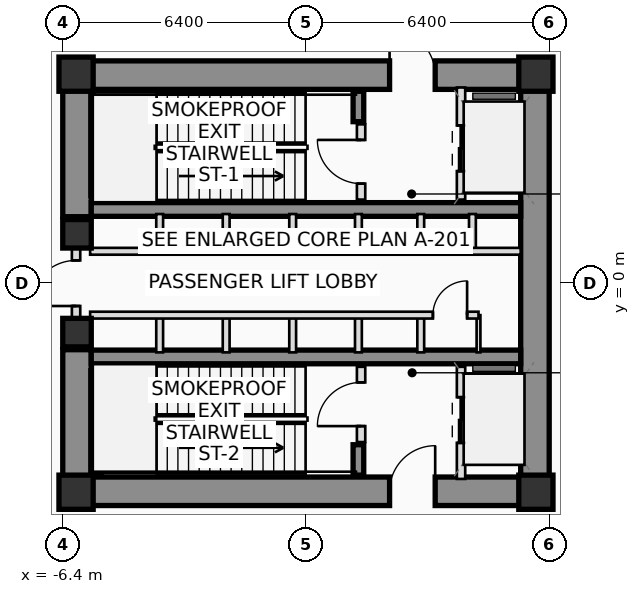
"""IFC4 building model, lengths in metres.
Left out: names, types, materials, properties, quantities, classifications, styles, units other than length and angle.
Written with IfcOpenShell. Run it as: python <this file> out.ifc"""

import sys

from ifc_helpers import new_model, si_unit, direction, frame, frame_2d, origin, origin_2d, place, context, subcontext, project, spatial, rectangle, extrude, source, transform, mapped, element, fill, save


model = new_model("IFC4")
c1 = context("Model", 3, precision=1e-05, world=origin(), true_north=direction((0.0, 1.0)))
c2 = subcontext(c1, "Body", "Model", "MODEL_VIEW")
j1 = project(units=[si_unit("LENGTHUNIT", "METRE"), si_unit("PLANEANGLEUNIT", "RADIAN")], contexts=[c1])
p1 = place(None, origin())
s1 = spatial("IfcSite", under=j1, at=p1, CompositionType="ELEMENT")
p2 = place(p1, origin())
s2 = spatial("IfcBuilding", under=s1, at=p2, CompositionType="ELEMENT")
p3 = place(p2, frame((0.0, 0.0, -9.6)))
s3 = spatial("IfcBuildingStorey", under=s2, at=p3, CompositionType="ELEMENT", Elevation=-9.6)
m1 = source(origin(), c2, "Body", "SweptSolid", [
    extrude(rectangle(XDim=0.9, YDim=0.9, at=origin_2d()), origin(), (0.0, 0.0, 1.0), 4.8),
])
for number, where, z_axis, x_axis in (
    (1, (-6.05, -5.5, 0.0), (0.0, 0.0, 1.0), (1.0, 0.0, 0.0)),
    (2, (6.05, -5.5, 0.0), (0.0, 0.0, 1.0), (1.0, 0.0, 0.0)),
    (3, (6.05, 5.5, 0.0), (0.0, 0.0, 1.0), (1.0, 0.0, 0.0)),
    (4, (-6.05, 5.5, 0.0), (0.0, 0.0, 1.0), (1.0, 0.0, 0.0)),
):
    element("IfcColumn", number, at=place(p3, frame(where, z_axis=z_axis, x_axis=x_axis)), inside=s3, PredefinedType="COLUMN", context=c2, shape_type="MappedRepresentation", body=[
        mapped(m1, transform((0.0, 0.0, 0.0), scale=1.0)),
    ])
p4 = place(p3, frame((-6.4, 5.475, 0.0), z_axis=(0.0, 0.0, 1.0), x_axis=(1.0, 0.0, 0.0)))
e5 = element("IfcWall", 5, at=p4, inside=s3, PredefinedType="SHEAR", context=c2, shape_type="SweptSolid", body=[
    extrude(rectangle(XDim=12.8, YDim=0.75, at=frame_2d((6.4, 0.0))), origin(), (0.0, 0.0, 1.0), 4.8),
])
p5 = place(p4, frame((8.6, 0.0, 0.0)))
e6 = element("IfcOpeningElement", 6, at=p5, cuts=e5, PredefinedType="OPENING", context=c2, shape_type="SweptSolid", body=[
    extrude(rectangle(XDim=1.2, YDim=2.2, at=frame_2d((0.6, 1.1))), frame((0.0, 0.385, 0.0), z_axis=(0.0, -1.0, 0.0), x_axis=(1.0, 0.0, 0.0)), (0.0, 0.0, 1.0), 0.77),
])
p6 = place(p3, frame((-6.4, -5.475, 0.0), z_axis=(0.0, 0.0, 1.0), x_axis=(1.0, 0.0, 0.0)))
e7 = element("IfcWall", 7, at=p6, inside=s3, PredefinedType="SHEAR", context=c2, shape_type="SweptSolid", body=[
    extrude(rectangle(XDim=12.8, YDim=0.75, at=frame_2d((6.4, 0.0))), origin(), (0.0, 0.0, 1.0), 4.8),
])
p7 = place(p6, frame((8.6, 0.0, 0.0)))
e8 = element("IfcOpeningElement", 8, at=p7, cuts=e7, PredefinedType="OPENING", context=c2, shape_type="SweptSolid", body=[
    extrude(rectangle(XDim=1.2, YDim=2.2, at=frame_2d((0.6, 1.1))), frame((0.0, 0.385, 0.0), z_axis=(0.0, -1.0, 0.0), x_axis=(1.0, 0.0, 0.0)), (0.0, 0.0, 1.0), 0.77),
])
p8 = place(p3, frame((6.025, -5.1, 0.0), z_axis=(0.0, 0.0, 1.0), x_axis=(0.0, 1.0, 0.0)))
e9 = element("IfcWall", 9, at=p8, inside=s3, PredefinedType="SHEAR", context=c2, shape_type="SweptSolid", body=[
    extrude(rectangle(XDim=10.2, YDim=0.75, at=frame_2d((5.1, 0.0))), origin(), (0.0, 0.0, 1.0), 4.8),
])
for number, where, z_axis, x_axis in (
    (10, (-6.025, -5.1, 0.0), (0.0, 0.0, 1.0), (0.0, 1.0, 0.0)),
    (11, (-6.025, 1.75, 0.0), (0.0, 0.0, 1.0), (0.0, 1.0, 0.0)),
):
    element("IfcWall", number, at=place(p3, frame(where, z_axis=z_axis, x_axis=x_axis)), inside=s3, PredefinedType="SHEAR", context=c2, shape_type="SweptSolid", body=[
        extrude(rectangle(XDim=3.35, YDim=0.75, at=frame_2d((1.675, 0.0))), origin(), (0.0, 0.0, 1.0), 4.8),
    ])
for number, where, z_axis, x_axis in (
    (12, (-5.65, 1.94, 0.0), (0.0, 0.0, 1.0), (1.0, 0.0, 0.0)),
    (13, (-5.65, -1.94, 0.0), (0.0, 0.0, 1.0), (1.0, 0.0, 0.0)),
):
    element("IfcWall", number, at=place(p3, frame(where, z_axis=z_axis, x_axis=x_axis)), inside=s3, PredefinedType="SHEAR", context=c2, shape_type="SweptSolid", body=[
        extrude(rectangle(XDim=11.3, YDim=0.36, at=frame_2d((5.65, 0.0))), origin(), (0.0, 0.0, 1.0), 4.8),
    ])
p9 = place(p3, frame((-5.52, 2.3, 0.0), z_axis=(0.0, 0.0, 1.0), x_axis=(0.0, 1.0, 0.0)))
e14 = element("IfcWall", 14, at=p9, inside=s3, PredefinedType="SHEAR", context=c2, shape_type="SweptSolid", body=[
    extrude(rectangle(XDim=2.75, YDim=0.28, at=frame_2d((1.375, 0.0))), origin(), (0.0, 0.0, 1.0), 4.8),
])
p10 = place(p3, frame((1.38, 4.25, 0.0), z_axis=(0.0, 0.0, 1.0), x_axis=(0.0, 1.0, 0.0)))
e15 = element("IfcWall", 15, at=p10, inside=s3, PredefinedType="SHEAR", context=c2, shape_type="SweptSolid", body=[
    extrude(rectangle(XDim=0.8, YDim=0.28, at=frame_2d((0.4, 0.0))), origin(), (0.0, 0.0, 1.0), 4.8),
])
p11 = place(p3, frame((-5.52, -5.05, 0.0), z_axis=(0.0, 0.0, 1.0), x_axis=(0.0, 1.0, 0.0)))
e16 = element("IfcWall", 16, at=p11, inside=s3, PredefinedType="SHEAR", context=c2, shape_type="SweptSolid", body=[
    extrude(rectangle(XDim=2.75, YDim=0.28, at=frame_2d((1.375, 0.0))), origin(), (0.0, 0.0, 1.0), 4.8),
])
p12 = place(p3, frame((1.38, -5.05, 0.0), z_axis=(0.0, 0.0, 1.0), x_axis=(0.0, 1.0, 0.0)))
e17 = element("IfcWall", 17, at=p12, inside=s3, PredefinedType="SHEAR", context=c2, shape_type="SweptSolid", body=[
    extrude(rectangle(XDim=0.8, YDim=0.28, at=frame_2d((0.4, 0.0))), origin(), (0.0, 0.0, 1.0), 4.8),
])
m2 = source(origin(), c2, "Body", "SweptSolid", [
    extrude(rectangle(XDim=0.75, YDim=0.75, at=origin_2d()), origin(), (0.0, 0.0, 1.0), 4.8),
])
for number, where, z_axis, x_axis in (
    (18, (-6.025, -1.3, 0.0), (0.0, 0.0, 1.0), (1.0, 0.0, 0.0)),
    (19, (-6.025, 1.3, 0.0), (0.0, 0.0, 1.0), (1.0, 0.0, 0.0)),
):
    element("IfcColumn", number, at=place(p3, frame(where, z_axis=z_axis, x_axis=x_axis)), inside=s3, PredefinedType="COLUMN", context=c2, shape_type="MappedRepresentation", body=[
        mapped(m2, transform((0.0, 0.0, 0.0), scale=1.0)),
    ])
p13 = place(p3, frame((-6.05, -0.95, 0.0), z_axis=(0.0, 0.0, 1.0), x_axis=(0.0, 1.0, 0.0)))
e20 = element("IfcWall", 20, at=p13, inside=s3, PredefinedType="PLUMBINGWALL", context=c2, shape_type="SweptSolid", body=[
    extrude(rectangle(XDim=1.9, YDim=0.22, at=frame_2d((0.95, 0.0))), origin(), (0.0, 0.0, 1.0), 3.5),
])
p14 = place(p13, frame((0.35, 0.0, 0.0)))
e21 = element("IfcOpeningElement", 21, at=p14, cuts=e20, PredefinedType="OPENING", context=c2, shape_type="SweptSolid", body=[
    extrude(rectangle(XDim=1.2, YDim=2.2, at=frame_2d((0.6, 1.1))), frame((0.0, 0.12, 0.0), z_axis=(0.0, -1.0, 0.0), x_axis=(1.0, 0.0, 0.0)), (0.0, 0.0, 1.0), 0.24),
])
p15 = place(p3, frame((1.45, 2.2, 0.0), z_axis=(0.0, 0.0, 1.0), x_axis=(0.0, 1.0, 0.0)))
e22 = element("IfcWall", 22, at=p15, inside=s3, PredefinedType="PLUMBINGWALL", context=c2, shape_type="SweptSolid", body=[
    extrude(rectangle(XDim=1.98, YDim=0.22, at=frame_2d((0.99, 0.0))), origin(), (0.0, 0.0, 1.0), 4.52),
])
p16 = place(p15, frame((0.42, 0.0, 0.0)))
e23 = element("IfcOpeningElement", 23, at=p16, cuts=e22, PredefinedType="OPENING", context=c2, shape_type="SweptSolid", body=[
    extrude(rectangle(XDim=1.15, YDim=2.15, at=frame_2d((0.575, 1.075))), frame((0.0, 0.12, 0.0), z_axis=(0.0, -1.0, 0.0), x_axis=(1.0, 0.0, 0.0)), (0.0, 0.0, 1.0), 0.24),
])
p17 = place(p3, frame((4.08, 2.2, 0.0), z_axis=(0.0, 0.0, 1.0), x_axis=(0.0, 1.0, 0.0)))
e24 = element("IfcWall", 24, at=p17, inside=s3, PredefinedType="PLUMBINGWALL", context=c2, shape_type="SweptSolid", body=[
    extrude(rectangle(XDim=2.95, YDim=0.22, at=frame_2d((1.475, 0.0))), origin(), (0.0, 0.0, 1.0), 4.52),
])
p18 = place(p17, frame((0.75, 0.0, 0.0)))
e25 = element("IfcOpeningElement", 25, at=p18, cuts=e24, PredefinedType="OPENING", context=c2, shape_type="SweptSolid", body=[
    extrude(rectangle(XDim=1.2, YDim=2.25, at=frame_2d((0.6, 1.125))), frame((0.0, 0.12, 0.0), z_axis=(0.0, -1.0, 0.0), x_axis=(1.0, 0.0, 0.0)), (0.0, 0.0, 1.0), 0.24),
])
p19 = place(p3, frame((1.45, -4.18, 0.0), z_axis=(0.0, 0.0, 1.0), x_axis=(0.0, 1.0, 0.0)))
e26 = element("IfcWall", 26, at=p19, inside=s3, PredefinedType="PLUMBINGWALL", context=c2, shape_type="SweptSolid", body=[
    extrude(rectangle(XDim=1.98, YDim=0.22, at=frame_2d((0.99, 0.0))), origin(), (0.0, 0.0, 1.0), 4.52),
])
p20 = place(p19, frame((0.42, 0.0, 0.0)))
e27 = element("IfcOpeningElement", 27, at=p20, cuts=e26, PredefinedType="OPENING", context=c2, shape_type="SweptSolid", body=[
    extrude(rectangle(XDim=1.15, YDim=2.15, at=frame_2d((0.575, 1.075))), frame((0.0, 0.12, 0.0), z_axis=(0.0, -1.0, 0.0), x_axis=(1.0, 0.0, 0.0)), (0.0, 0.0, 1.0), 0.24),
])
p21 = place(p3, frame((4.08, -5.15, 0.0), z_axis=(0.0, 0.0, 1.0), x_axis=(0.0, 1.0, 0.0)))
e28 = element("IfcWall", 28, at=p21, inside=s3, PredefinedType="PLUMBINGWALL", context=c2, shape_type="SweptSolid", body=[
    extrude(rectangle(XDim=2.95, YDim=0.22, at=frame_2d((1.475, 0.0))), origin(), (0.0, 0.0, 1.0), 4.52),
])
p22 = place(p21, frame((0.95, 0.0, 0.0)))
e29 = element("IfcOpeningElement", 29, at=p22, cuts=e28, PredefinedType="OPENING", context=c2, shape_type="SweptSolid", body=[
    extrude(rectangle(XDim=1.2, YDim=2.25, at=frame_2d((0.6, 1.125))), frame((0.0, 0.12, 0.0), z_axis=(0.0, -1.0, 0.0), x_axis=(1.0, 0.0, 0.0)), (0.0, 0.0, 1.0), 0.24),
])
for number, where, z_axis, x_axis in (
    (30, (-3.85, 0.84, 0.0), (0.0, 0.0, 1.0), (0.0, 1.0, 0.0)),
    (31, (-3.85, -1.82, 0.0), (0.0, 0.0, 1.0), (0.0, 1.0, 0.0)),
    (32, (-2.1, 0.84, 0.0), (0.0, 0.0, 1.0), (0.0, 1.0, 0.0)),
    (33, (-2.1, -1.82, 0.0), (0.0, 0.0, 1.0), (0.0, 1.0, 0.0)),
    (34, (-0.35, 0.84, 0.0), (0.0, 0.0, 1.0), (0.0, 1.0, 0.0)),
    (35, (-0.35, -1.82, 0.0), (0.0, 0.0, 1.0), (0.0, 1.0, 0.0)),
    (36, (1.38, 0.84, 0.0), (0.0, 0.0, 1.0), (0.0, 1.0, 0.0)),
    (37, (1.38, -1.82, 0.0), (0.0, 0.0, 1.0), (0.0, 1.0, 0.0)),
    (38, (3.02, 0.84, 0.0), (0.0, 0.0, 1.0), (0.0, 1.0, 0.0)),
    (39, (4.38, 0.84, 0.0), (0.0, 0.0, 1.0), (0.0, 1.0, 0.0)),
    (40, (3.02, -1.82, 0.0), (0.0, 0.0, 1.0), (0.0, 1.0, 0.0)),
):
    element("IfcWall", number, at=place(p3, frame(where, z_axis=z_axis, x_axis=x_axis)), inside=s3, PredefinedType="PLUMBINGWALL", context=c2, shape_type="SweptSolid", body=[
        extrude(rectangle(XDim=0.98, YDim=0.18, at=frame_2d((0.49, 0.0))), origin(), (0.0, 0.0, 1.0), 4.52),
    ])
p23 = place(p3, frame((4.54, -1.82, 0.0), z_axis=(0.0, 0.0, 1.0), x_axis=(0.0, 1.0, 0.0)))
e41 = element("IfcWall", 41, at=p23, inside=s3, PredefinedType="PARTITIONING", context=c2, shape_type="SweptSolid", body=[
    extrude(rectangle(XDim=0.98, YDim=0.1, at=frame_2d((0.49, 0.0))), origin(), (0.0, 0.0, 1.0), 4.52),
])
p24 = place(p3, frame((-5.68, 0.84, 0.0), z_axis=(0.0, 0.0, 1.0), x_axis=(1.0, 0.0, 0.0)))
e42 = element("IfcWall", 42, at=p24, inside=s3, PredefinedType="PLUMBINGWALL", context=c2, shape_type="SweptSolid", body=[
    extrude(rectangle(XDim=11.33, YDim=0.18, at=frame_2d((5.665, 0.0))), origin(), (0.0, 0.0, 1.0), 4.52),
])
p25 = place(p3, frame((-5.68, -0.84, 0.0), z_axis=(0.0, 0.0, 1.0), x_axis=(1.0, 0.0, 0.0)))
e43 = element("IfcWall", 43, at=p25, inside=s3, PredefinedType="PLUMBINGWALL", context=c2, shape_type="SweptSolid", body=[
    extrude(rectangle(XDim=10.22, YDim=0.18, at=frame_2d((5.11, 0.0))), origin(), (0.0, 0.0, 1.0), 4.52),
])
p26 = place(p25, frame((9.02, 0.0, 0.0)))
e44 = element("IfcOpeningElement", 44, at=p26, cuts=e43, PredefinedType="OPENING", context=c2, shape_type="SweptSolid", body=[
    extrude(rectangle(XDim=0.9, YDim=2.05, at=frame_2d((0.45, 1.025))), frame((0.0, 0.1, 0.0), z_axis=(0.0, -1.0, 0.0), x_axis=(1.0, 0.0, 0.0)), (0.0, 0.0, 1.0), 0.2),
])
p27 = place(p5, origin())
e45 = element("IfcDoor", 45, at=p27, inside=s3, OperationType="SINGLE_SWING_LEFT", PredefinedType="DOOR", context=c2, shape_type="SweptSolid", body=[
    extrude(rectangle(XDim=1.2, YDim=2.2, at=frame_2d((0.6, 1.1))), frame((0.0, 0.025, 0.0), z_axis=(0.0, -1.0, 0.0), x_axis=(1.0, 0.0, 0.0)), (0.0, 0.0, 1.0), 0.05),
])
fill(e6, e45)
p28 = place(p7, origin())
e46 = element("IfcDoor", 46, at=p28, inside=s3, OperationType="SINGLE_SWING_RIGHT", PredefinedType="DOOR", context=c2, shape_type="SweptSolid", body=[
    extrude(rectangle(XDim=1.2, YDim=2.2, at=frame_2d((0.6, 1.1))), frame((0.0, 0.025, 0.0), z_axis=(0.0, -1.0, 0.0), x_axis=(1.0, 0.0, 0.0)), (0.0, 0.0, 1.0), 0.05),
])
fill(e8, e46)
p29 = place(p14, origin())
e47 = element("IfcDoor", 47, at=p29, inside=s3, OperationType="SINGLE_SWING_LEFT", PredefinedType="DOOR", context=c2, shape_type="SweptSolid", body=[
    extrude(rectangle(XDim=1.2, YDim=2.2, at=frame_2d((0.6, 1.1))), frame((0.0, 0.025, 0.0), z_axis=(0.0, -1.0, 0.0), x_axis=(1.0, 0.0, 0.0)), (0.0, 0.0, 1.0), 0.05),
])
fill(e21, e47)
p30 = place(p16, origin())
e48 = element("IfcDoor", 48, at=p30, inside=s3, OperationType="SINGLE_SWING_RIGHT", PredefinedType="DOOR", context=c2, shape_type="SweptSolid", body=[
    extrude(rectangle(XDim=1.15, YDim=2.15, at=frame_2d((0.575, 1.075))), frame((0.0, 0.025, 0.0), z_axis=(0.0, -1.0, 0.0), x_axis=(1.0, 0.0, 0.0)), (0.0, 0.0, 1.0), 0.05),
])
fill(e23, e48)
p31 = place(p18, origin())
e49 = element("IfcDoor", 49, at=p31, inside=s3, OperationType="DOUBLE_DOOR_SLIDING", PredefinedType="DOOR", context=c2, shape_type="SweptSolid", body=[
    extrude(rectangle(XDim=1.2, YDim=2.25, at=frame_2d((0.6, 1.125))), frame((0.0, 0.025, 0.0), z_axis=(0.0, -1.0, 0.0), x_axis=(1.0, 0.0, 0.0)), (0.0, 0.0, 1.0), 0.05),
])
fill(e25, e49)
p32 = place(p20, origin())
e50 = element("IfcDoor", 50, at=p32, inside=s3, OperationType="SINGLE_SWING_LEFT", PredefinedType="DOOR", context=c2, shape_type="SweptSolid", body=[
    extrude(rectangle(XDim=1.15, YDim=2.15, at=frame_2d((0.575, 1.075))), frame((0.0, 0.025, 0.0), z_axis=(0.0, -1.0, 0.0), x_axis=(1.0, 0.0, 0.0)), (0.0, 0.0, 1.0), 0.05),
])
fill(e27, e50)
p33 = place(p22, origin())
e51 = element("IfcDoor", 51, at=p33, inside=s3, OperationType="DOUBLE_DOOR_SLIDING", PredefinedType="DOOR", context=c2, shape_type="SweptSolid", body=[
    extrude(rectangle(XDim=1.2, YDim=2.25, at=frame_2d((0.6, 1.125))), frame((0.0, 0.025, 0.0), z_axis=(0.0, -1.0, 0.0), x_axis=(1.0, 0.0, 0.0)), (0.0, 0.0, 1.0), 0.05),
])
fill(e29, e51)
p34 = place(p26, origin())
e52 = element("IfcDoor", 52, at=p34, inside=s3, OperationType="SINGLE_SWING_RIGHT", PredefinedType="DOOR", context=c2, shape_type="SweptSolid", body=[
    extrude(rectangle(XDim=0.9, YDim=2.05, at=frame_2d((0.45, 1.025))), frame((0.0, 0.025, 0.0), z_axis=(0.0, -1.0, 0.0), x_axis=(1.0, 0.0, 0.0)), (0.0, 0.0, 1.0), 0.05),
])
fill(e44, e52)
save(model, sys.argv[1])
